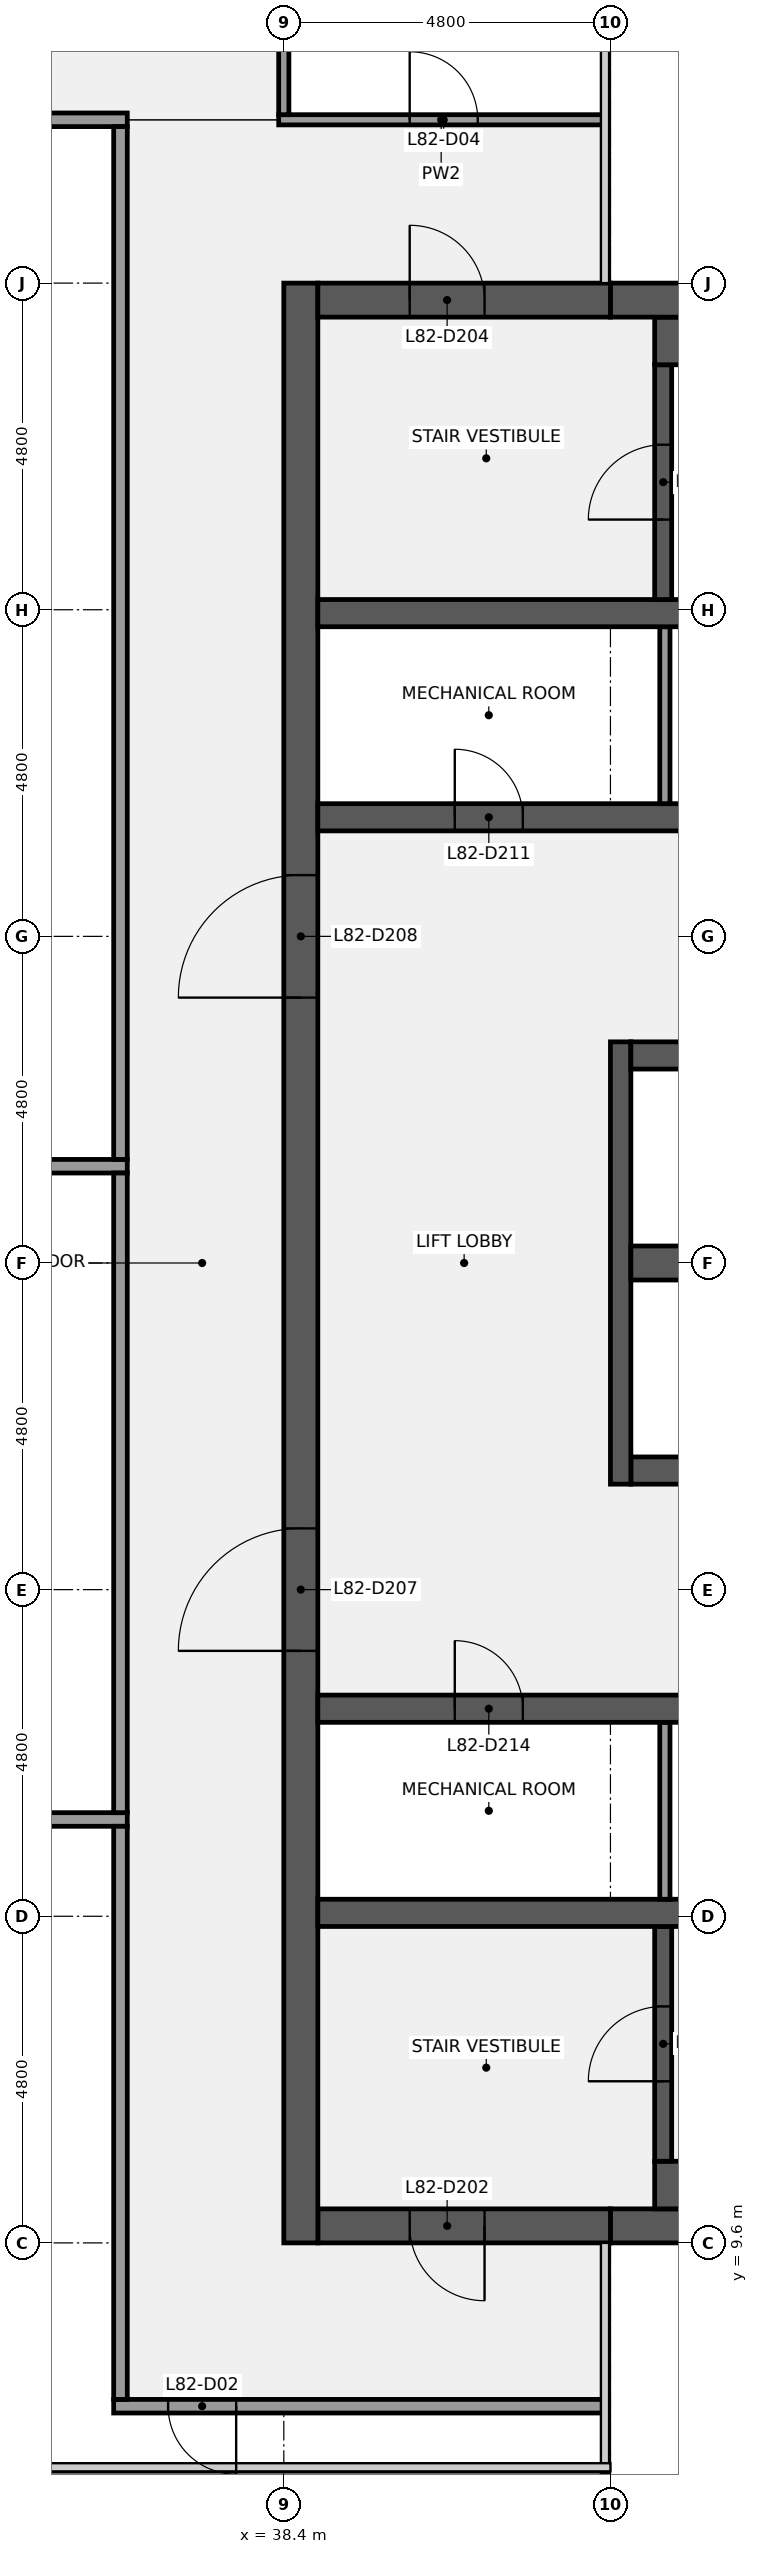
"""IFC4 building model, lengths in metres.
Left out: names, types, materials, properties, quantities, classifications, styles, units other than length and angle.
Written with IfcOpenShell. Run it as: python <this file> out.ifc"""

import sys

from ifc_helpers import new_model, si_unit, direction, frame, frame_2d, origin, place, context, subcontext, project, spatial, rectangle, extrude, element, fill, save


model = new_model("IFC4")
c1 = context("Model", 3, precision=1e-05, world=origin(), true_north=direction((0.0, 1.0)))
c2 = subcontext(c1, "Body", "Model", "MODEL_VIEW")
j1 = project(units=[si_unit("LENGTHUNIT", "METRE"), si_unit("PLANEANGLEUNIT", "RADIAN")], contexts=[c1])
p1 = place(None, origin())
s1 = spatial("IfcSite", under=j1, at=p1, CompositionType="ELEMENT")
p2 = place(p1, origin())
s2 = spatial("IfcBuilding", under=s1, at=p2, CompositionType="ELEMENT")
p3 = place(p2, frame((0.0, 0.0, 366.3)))
s3 = spatial("IfcBuildingStorey", under=s2, at=p3, CompositionType="ELEMENT", Elevation=366.3)
p4 = place(p3, frame((57.1, 9.85, 0.0), z_axis=(0.0, 0.0, 1.0), x_axis=(-1.0, 0.0, 0.0)))
e1 = element("IfcWall", 1, at=p4, inside=s3, PredefinedType="SHEAR", context=c2, shape_type="SweptSolid", body=[
    extrude(rectangle(XDim=13.9, YDim=0.5, at=frame_2d((6.95, 0.0))), origin(), (0.0, 0.0, 1.0), 3.75),
])
p5 = place(p3, frame((43.2, 9.85, 0.0), z_axis=(0.0, 0.0, 1.0), x_axis=(-1.0, 0.0, 0.0)))
e2 = element("IfcWall", 2, at=p5, inside=s3, PredefinedType="SHEAR", context=c2, shape_type="SweptSolid", body=[
    extrude(rectangle(XDim=4.3, YDim=0.5, at=frame_2d((2.15, 0.0))), origin(), (0.0, 0.0, 1.0), 3.75),
])
p6 = place(p5, frame((1.85, 0.0, 0.0)))
e3 = element("IfcOpeningElement", 3, at=p6, cuts=e2, PredefinedType="OPENING", context=c2, shape_type="SweptSolid", body=[
    extrude(rectangle(XDim=1.1, YDim=2.1, at=frame_2d((0.55, 1.05))), frame((0.0, 0.26, 0.0), z_axis=(0.0, -1.0, 0.0), x_axis=(1.0, 0.0, 0.0)), (0.0, 0.0, 1.0), 0.52),
])
p7 = place(p3, frame((38.65, 9.6, 0.0), z_axis=(0.0, 0.0, 1.0), x_axis=(0.0, 1.0, 0.0)))
e4 = element("IfcWall", 4, at=p7, inside=s3, PredefinedType="SHEAR", context=c2, shape_type="SweptSolid", body=[
    extrude(rectangle(XDim=28.8, YDim=0.5, at=frame_2d((14.4, 0.0))), origin(), (0.0, 0.0, 1.0), 3.75),
])
p8 = place(p7, frame((8.7, 0.0, 0.0)))
e5 = element("IfcOpeningElement", 5, at=p8, cuts=e4, PredefinedType="OPENING", context=c2, shape_type="SweptSolid", body=[
    extrude(rectangle(XDim=1.8, YDim=2.1, at=frame_2d((0.9, 1.05))), frame((0.0, 0.26, 0.0), z_axis=(0.0, -1.0, 0.0), x_axis=(1.0, 0.0, 0.0)), (0.0, 0.0, 1.0), 0.52),
])
p9 = place(p7, frame((18.3, 0.0, 0.0)))
e6 = element("IfcOpeningElement", 6, at=p9, cuts=e4, PredefinedType="OPENING", context=c2, shape_type="SweptSolid", body=[
    extrude(rectangle(XDim=1.8, YDim=2.1, at=frame_2d((0.9, 1.05))), frame((0.0, 0.26, 0.0), z_axis=(0.0, -1.0, 0.0), x_axis=(1.0, 0.0, 0.0)), (0.0, 0.0, 1.0), 0.52),
])
p10 = place(p3, frame((43.85, 10.45, 0.0), z_axis=(0.0, 0.0, 1.0), x_axis=(1.0, 0.0, 0.0)))
e7 = element("IfcWall", 7, at=p10, inside=s3, PredefinedType="SHEAR", context=c2, shape_type="SweptSolid", body=[
    extrude(rectangle(XDim=7.5, YDim=0.7, at=frame_2d((3.75, 0.0))), origin(), (0.0, 0.0, 1.0), 3.75),
])
p11 = place(p3, frame((43.975, 10.8, 0.0), z_axis=(0.0, 0.0, 1.0), x_axis=(0.0, 1.0, 0.0)))
e8 = element("IfcWall", 8, at=p11, inside=s3, PredefinedType="SHEAR", context=c2, shape_type="SweptSolid", body=[
    extrude(rectangle(XDim=3.45, YDim=0.25, at=frame_2d((1.725, 0.0))), origin(), (0.0, 0.0, 1.0), 3.75),
])
p12 = place(p11, frame((1.175, 0.0, 0.0)))
e9 = element("IfcOpeningElement", 9, at=p12, cuts=e8, PredefinedType="OPENING", context=c2, shape_type="SweptSolid", body=[
    extrude(rectangle(XDim=1.1, YDim=2.1, at=frame_2d((0.55, 1.05))), frame((0.0, 0.135, 0.0), z_axis=(0.0, -1.0, 0.0), x_axis=(1.0, 0.0, 0.0)), (0.0, 0.0, 1.0), 0.27),
])
p13 = place(p3, frame((38.9, 14.45, 0.0), z_axis=(0.0, 0.0, 1.0), x_axis=(1.0, 0.0, 0.0)))
e10 = element("IfcWall", 10, at=p13, inside=s3, PredefinedType="SHEAR", context=c2, shape_type="SweptSolid", body=[
    extrude(rectangle(XDim=18.2, YDim=0.4, at=frame_2d((9.1, 0.0))), origin(), (0.0, 0.0, 1.0), 3.75),
])
p14 = place(p3, frame((44.0, 14.65, 0.0), z_axis=(0.0, 0.0, 1.0), x_axis=(0.0, 1.0, 0.0)))
e11 = element("IfcWall", 11, at=p14, inside=s3, PredefinedType="PARTITIONING", context=c2, shape_type="SweptSolid", body=[
    extrude(rectangle(XDim=2.6, YDim=0.15, at=frame_2d((1.3, 0.0))), origin(), (0.0, 0.0, 1.0), 3.75),
])
p15 = place(p3, frame((38.9, 17.45, 0.0), z_axis=(0.0, 0.0, 1.0), x_axis=(1.0, 0.0, 0.0)))
e12 = element("IfcWall", 12, at=p15, inside=s3, PredefinedType="SHEAR", context=c2, shape_type="SweptSolid", body=[
    extrude(rectangle(XDim=18.2, YDim=0.4, at=frame_2d((9.1, 0.0))), origin(), (0.0, 0.0, 1.0), 3.75),
])
p16 = place(p15, frame((13.587, 0.0, 0.0)))
e13 = element("IfcOpeningElement", 13, at=p16, cuts=e12, PredefinedType="OPENING", context=c2, shape_type="SweptSolid", body=[
    extrude(rectangle(XDim=1.0, YDim=2.1, at=frame_2d((0.5, 1.05))), frame((0.0, 0.21, 0.0), z_axis=(0.0, -1.0, 0.0), x_axis=(1.0, 0.0, 0.0)), (0.0, 0.0, 1.0), 0.42),
])
p17 = place(p15, frame((7.0, 0.0, 0.0)))
e14 = element("IfcOpeningElement", 14, at=p17, cuts=e12, PredefinedType="OPENING", context=c2, shape_type="SweptSolid", body=[
    extrude(rectangle(XDim=1.0, YDim=2.1, at=frame_2d((0.5, 1.05))), frame((0.0, 0.21, 0.0), z_axis=(0.0, -1.0, 0.0), x_axis=(1.0, 0.0, 0.0)), (0.0, 0.0, 1.0), 0.42),
])
p18 = place(p15, frame((2.012, 0.0, 0.0)))
e15 = element("IfcOpeningElement", 15, at=p18, cuts=e12, PredefinedType="OPENING", context=c2, shape_type="SweptSolid", body=[
    extrude(rectangle(XDim=1.0, YDim=2.1, at=frame_2d((0.5, 1.05))), frame((0.0, 0.21, 0.0), z_axis=(0.0, -1.0, 0.0), x_axis=(1.0, 0.0, 0.0)), (0.0, 0.0, 1.0), 0.42),
])
p19 = place(p3, frame((43.5, 20.95, 0.0), z_axis=(0.0, 0.0, 1.0), x_axis=(1.0, 0.0, 0.0)))
e16 = element("IfcWall", 16, at=p19, inside=s3, PredefinedType="SHEAR", context=c2, shape_type="SweptSolid", body=[
    extrude(rectangle(XDim=13.6, YDim=0.4, at=frame_2d((6.8, 0.0))), origin(), (0.0, 0.0, 1.0), 3.75),
])
p20 = place(p19, frame((6.15, 0.0, 0.0)))
e17 = element("IfcOpeningElement", 17, at=p20, cuts=e16, PredefinedType="OPENING", context=c2, shape_type="SweptSolid", body=[
    extrude(rectangle(XDim=1.1, YDim=2.1, at=frame_2d((0.55, 1.05))), frame((0.0, 0.21, 0.0), z_axis=(0.0, -1.0, 0.0), x_axis=(1.0, 0.0, 0.0)), (0.0, 0.0, 1.0), 0.42),
])
p21 = place(p19, frame((1.3, 0.0, 0.0)))
e18 = element("IfcOpeningElement", 18, at=p21, cuts=e16, PredefinedType="OPENING", context=c2, shape_type="SweptSolid", body=[
    extrude(rectangle(XDim=1.0, YDim=2.1, at=frame_2d((0.5, 1.05))), frame((0.0, 0.21, 0.0), z_axis=(0.0, -1.0, 0.0), x_axis=(1.0, 0.0, 0.0)), (0.0, 0.0, 1.0), 0.42),
])
p22 = place(p3, frame((43.35, 20.75, 0.0), z_axis=(0.0, 0.0, 1.0), x_axis=(0.0, 1.0, 0.0)))
e19 = element("IfcWall", 19, at=p22, inside=s3, PredefinedType="SHEAR", context=c2, shape_type="SweptSolid", body=[
    extrude(rectangle(XDim=6.5, YDim=0.3, at=frame_2d((3.25, 0.0))), origin(), (0.0, 0.0, 1.0), 3.75),
])
p23 = place(p3, frame((43.5, 24.0, 0.0), z_axis=(0.0, 0.0, 1.0), x_axis=(1.0, 0.0, 0.0)))
e20 = element("IfcWall", 20, at=p23, inside=s3, PredefinedType="SHEAR", context=c2, shape_type="SweptSolid", body=[
    extrude(rectangle(XDim=13.6, YDim=0.5, at=frame_2d((6.8, 0.0))), origin(), (0.0, 0.0, 1.0), 3.75),
])
p24 = place(p3, frame((43.5, 27.05, 0.0), z_axis=(0.0, 0.0, 1.0), x_axis=(1.0, 0.0, 0.0)))
e21 = element("IfcWall", 21, at=p24, inside=s3, PredefinedType="SHEAR", context=c2, shape_type="SweptSolid", body=[
    extrude(rectangle(XDim=13.6, YDim=0.4, at=frame_2d((6.8, 0.0))), origin(), (0.0, 0.0, 1.0), 3.75),
])
p25 = place(p24, frame((8.7, 0.0, 0.0)))
e22 = element("IfcOpeningElement", 22, at=p25, cuts=e21, PredefinedType="OPENING", context=c2, shape_type="SweptSolid", body=[
    extrude(rectangle(XDim=1.0, YDim=2.1, at=frame_2d((0.5, 1.05))), frame((0.0, 0.21, 0.0), z_axis=(0.0, -1.0, 0.0), x_axis=(1.0, 0.0, 0.0)), (0.0, 0.0, 1.0), 0.42),
])
p26 = place(p24, frame((1.5, 0.0, 0.0)))
e23 = element("IfcOpeningElement", 23, at=p26, cuts=e21, PredefinedType="OPENING", context=c2, shape_type="SweptSolid", body=[
    extrude(rectangle(XDim=1.2, YDim=2.1, at=frame_2d((0.6, 1.05))), frame((0.0, 0.21, 0.0), z_axis=(0.0, -1.0, 0.0), x_axis=(1.0, 0.0, 0.0)), (0.0, 0.0, 1.0), 0.42),
])
p27 = place(p3, frame((38.9, 30.55, 0.0), z_axis=(0.0, 0.0, 1.0), x_axis=(1.0, 0.0, 0.0)))
e24 = element("IfcWall", 24, at=p27, inside=s3, PredefinedType="SHEAR", context=c2, shape_type="SweptSolid", body=[
    extrude(rectangle(XDim=18.2, YDim=0.4, at=frame_2d((9.1, 0.0))), origin(), (0.0, 0.0, 1.0), 3.75),
])
p28 = place(p27, frame((13.587, 0.0, 0.0)))
e25 = element("IfcOpeningElement", 25, at=p28, cuts=e24, PredefinedType="OPENING", context=c2, shape_type="SweptSolid", body=[
    extrude(rectangle(XDim=1.0, YDim=2.1, at=frame_2d((0.5, 1.05))), frame((0.0, 0.21, 0.0), z_axis=(0.0, -1.0, 0.0), x_axis=(1.0, 0.0, 0.0)), (0.0, 0.0, 1.0), 0.42),
])
p29 = place(p27, frame((7.0, 0.0, 0.0)))
e26 = element("IfcOpeningElement", 26, at=p29, cuts=e24, PredefinedType="OPENING", context=c2, shape_type="SweptSolid", body=[
    extrude(rectangle(XDim=1.0, YDim=2.1, at=frame_2d((0.5, 1.05))), frame((0.0, 0.21, 0.0), z_axis=(0.0, -1.0, 0.0), x_axis=(1.0, 0.0, 0.0)), (0.0, 0.0, 1.0), 0.42),
])
p30 = place(p27, frame((2.012, 0.0, 0.0)))
e27 = element("IfcOpeningElement", 27, at=p30, cuts=e24, PredefinedType="OPENING", context=c2, shape_type="SweptSolid", body=[
    extrude(rectangle(XDim=1.0, YDim=2.1, at=frame_2d((0.5, 1.05))), frame((0.0, 0.21, 0.0), z_axis=(0.0, -1.0, 0.0), x_axis=(1.0, 0.0, 0.0)), (0.0, 0.0, 1.0), 0.42),
])
p31 = place(p3, frame((44.0, 30.75, 0.0), z_axis=(0.0, 0.0, 1.0), x_axis=(0.0, 1.0, 0.0)))
e28 = element("IfcWall", 28, at=p31, inside=s3, PredefinedType="PARTITIONING", context=c2, shape_type="SweptSolid", body=[
    extrude(rectangle(XDim=2.6, YDim=0.15, at=frame_2d((1.3, 0.0))), origin(), (0.0, 0.0, 1.0), 3.75),
])
p32 = place(p3, frame((38.9, 33.55, 0.0), z_axis=(0.0, 0.0, 1.0), x_axis=(1.0, 0.0, 0.0)))
e29 = element("IfcWall", 29, at=p32, inside=s3, PredefinedType="SHEAR", context=c2, shape_type="SweptSolid", body=[
    extrude(rectangle(XDim=18.2, YDim=0.4, at=frame_2d((9.1, 0.0))), origin(), (0.0, 0.0, 1.0), 3.75),
])
p33 = place(p3, frame((43.975, 33.75, 0.0), z_axis=(0.0, 0.0, 1.0), x_axis=(0.0, 1.0, 0.0)))
e30 = element("IfcWall", 30, at=p33, inside=s3, PredefinedType="SHEAR", context=c2, shape_type="SweptSolid", body=[
    extrude(rectangle(XDim=3.45, YDim=0.25, at=frame_2d((1.725, 0.0))), origin(), (0.0, 0.0, 1.0), 3.75),
])
p34 = place(p33, frame((1.175, 0.0, 0.0)))
e31 = element("IfcOpeningElement", 31, at=p34, cuts=e30, PredefinedType="OPENING", context=c2, shape_type="SweptSolid", body=[
    extrude(rectangle(XDim=1.1, YDim=2.1, at=frame_2d((0.55, 1.05))), frame((0.0, 0.135, 0.0), z_axis=(0.0, -1.0, 0.0), x_axis=(1.0, 0.0, 0.0)), (0.0, 0.0, 1.0), 0.27),
])
p35 = place(p3, frame((43.85, 37.55, 0.0), z_axis=(0.0, 0.0, 1.0), x_axis=(1.0, 0.0, 0.0)))
e32 = element("IfcWall", 32, at=p35, inside=s3, PredefinedType="SHEAR", context=c2, shape_type="SweptSolid", body=[
    extrude(rectangle(XDim=7.5, YDim=0.7, at=frame_2d((3.75, 0.0))), origin(), (0.0, 0.0, 1.0), 3.75),
])
p36 = place(p3, frame((43.2, 38.15, 0.0), z_axis=(0.0, 0.0, 1.0), x_axis=(1.0, 0.0, 0.0)))
e33 = element("IfcWall", 33, at=p36, inside=s3, PredefinedType="SHEAR", context=c2, shape_type="SweptSolid", body=[
    extrude(rectangle(XDim=13.9, YDim=0.5, at=frame_2d((6.95, 0.0))), origin(), (0.0, 0.0, 1.0), 3.75),
])
p37 = place(p3, frame((38.9, 38.15, 0.0), z_axis=(0.0, 0.0, 1.0), x_axis=(1.0, 0.0, 0.0)))
e34 = element("IfcWall", 34, at=p37, inside=s3, PredefinedType="SHEAR", context=c2, shape_type="SweptSolid", body=[
    extrude(rectangle(XDim=4.3, YDim=0.5, at=frame_2d((2.15, 0.0))), origin(), (0.0, 0.0, 1.0), 3.75),
])
p38 = place(p37, frame((1.35, 0.0, 0.0)))
e35 = element("IfcOpeningElement", 35, at=p38, cuts=e34, PredefinedType="OPENING", context=c2, shape_type="SweptSolid", body=[
    extrude(rectangle(XDim=1.1, YDim=2.1, at=frame_2d((0.55, 1.05))), frame((0.0, 0.26, 0.0), z_axis=(0.0, -1.0, 0.0), x_axis=(1.0, 0.0, 0.0)), (0.0, 0.0, 1.0), 0.52),
])
p39 = place(p3, frame((35.9, 7.2, 0.0), z_axis=(0.0, 0.0, 1.0), x_axis=(1.0, 0.0, 0.0)))
e36 = element("IfcWall", 36, at=p39, inside=s3, PredefinedType="PARTITIONING", context=c2, shape_type="SweptSolid", body=[
    extrude(rectangle(XDim=7.2, YDim=0.2, at=frame_2d((3.6, 0.0))), origin(), (0.0, 0.0, 1.0), 2.759),
])
p40 = place(p39, frame((0.8, 0.0, 0.0)))
e37 = element("IfcOpeningElement", 37, at=p40, cuts=e36, PredefinedType="OPENING", context=c2, shape_type="SweptSolid", body=[
    extrude(rectangle(XDim=1.0, YDim=2.1, at=frame_2d((0.5, 1.05))), frame((0.0, 0.11, 0.0), z_axis=(0.0, -1.0, 0.0), x_axis=(1.0, 0.0, 0.0)), (0.0, 0.0, 1.0), 0.22),
])
for number, where, z_axis, x_axis in (
    (38, (21.5, 15.822, 0.0), (0.0, 0.0, 1.0), (1.0, 0.0, 0.0)),
    (39, (21.5, 25.422, 0.0), (0.0, 0.0, 1.0), (1.0, 0.0, 0.0)),
):
    element("IfcWall", number, at=place(p3, frame(where, z_axis=z_axis, x_axis=x_axis)), inside=s3, PredefinedType="PARTITIONING", context=c2, shape_type="SweptSolid", body=[
        extrude(rectangle(XDim=14.6, YDim=0.2, at=frame_2d((7.3, 0.0))), origin(), (0.0, 0.0, 1.0), 2.759),
    ])
p41 = place(p3, frame((38.325, 40.8, 0.0), z_axis=(0.0, 0.0, 1.0), x_axis=(1.0, 0.0, 0.0)))
e40 = element("IfcWall", 40, at=p41, inside=s3, PredefinedType="PARTITIONING", context=c2, shape_type="SweptSolid", body=[
    extrude(rectangle(XDim=4.775, YDim=0.15, at=frame_2d((2.388, 0.0))), origin(), (0.0, 0.0, 1.0), 2.759),
])
p42 = place(p41, frame((1.925, 0.0, 0.0)))
e41 = element("IfcOpeningElement", 41, at=p42, cuts=e40, PredefinedType="OPENING", context=c2, shape_type="SweptSolid", body=[
    extrude(rectangle(XDim=1.0, YDim=2.1, at=frame_2d((0.5, 1.05))), frame((0.0, 0.085, 0.0), z_axis=(0.0, -1.0, 0.0), x_axis=(1.0, 0.0, 0.0)), (0.0, 0.0, 1.0), 0.17),
])
p43 = place(p3, frame((21.5, 40.8, 0.0), z_axis=(0.0, 0.0, 1.0), x_axis=(1.0, 0.0, 0.0)))
e42 = element("IfcWall", 42, at=p43, inside=s3, PredefinedType="PARTITIONING", context=c2, shape_type="SweptSolid", body=[
    extrude(rectangle(XDim=14.6, YDim=0.2, at=frame_2d((7.3, 0.0))), origin(), (0.0, 0.0, 1.0), 2.759),
])
p44 = place(p3, frame((36.0, 7.3, 0.0), z_axis=(0.0, 0.0, 1.0), x_axis=(0.0, 1.0, 0.0)))
e43 = element("IfcWall", 43, at=p44, inside=s3, PredefinedType="PARTITIONING", context=c2, shape_type="SweptSolid", body=[
    extrude(rectangle(XDim=8.422, YDim=0.2, at=frame_2d((4.211, 0.0))), origin(), (0.0, 0.0, 1.0), 2.759),
])
p45 = place(p3, frame((36.0, 15.922, 0.0), z_axis=(0.0, 0.0, 1.0), x_axis=(0.0, 1.0, 0.0)))
e44 = element("IfcWall", 44, at=p45, inside=s3, PredefinedType="PARTITIONING", context=c2, shape_type="SweptSolid", body=[
    extrude(rectangle(XDim=9.4, YDim=0.2, at=frame_2d((4.7, 0.0))), origin(), (0.0, 0.0, 1.0), 2.759),
])
p46 = place(p3, frame((36.0, 25.522, 0.0), z_axis=(0.0, 0.0, 1.0), x_axis=(0.0, 1.0, 0.0)))
e45 = element("IfcWall", 45, at=p46, inside=s3, PredefinedType="PARTITIONING", context=c2, shape_type="SweptSolid", body=[
    extrude(rectangle(XDim=15.178, YDim=0.2, at=frame_2d((7.589, 0.0))), origin(), (0.0, 0.0, 1.0), 2.759),
])
p47 = place(p3, frame((38.4, 40.875, 0.0), z_axis=(0.0, 0.0, 1.0), x_axis=(0.0, 1.0, 0.0)))
e46 = element("IfcWall", 46, at=p47, inside=s3, PredefinedType="PARTITIONING", context=c2, shape_type="SweptSolid", body=[
    extrude(rectangle(XDim=2.225, YDim=0.15, at=frame_2d((1.113, 0.0))), origin(), (0.0, 0.0, 1.0), 2.759),
])
p48 = place(p12, origin())
e47 = element("IfcDoor", 47, at=p48, inside=s3, OperationType="SINGLE_SWING_LEFT", PredefinedType="DOOR", context=c2, shape_type="SweptSolid", body=[
    extrude(rectangle(XDim=1.1, YDim=2.1, at=frame_2d((0.55, 1.05))), frame((0.0, 0.025, 0.0), z_axis=(0.0, -1.0, 0.0), x_axis=(1.0, 0.0, 0.0)), (0.0, 0.0, 1.0), 0.05),
])
fill(e9, e47)
p49 = place(p6, origin())
e48 = element("IfcDoor", 48, at=p49, inside=s3, OperationType="SINGLE_SWING_LEFT", PredefinedType="DOOR", context=c2, shape_type="SweptSolid", body=[
    extrude(rectangle(XDim=1.1, YDim=2.1, at=frame_2d((0.55, 1.05))), frame((0.0, 0.025, 0.0), z_axis=(0.0, -1.0, 0.0), x_axis=(1.0, 0.0, 0.0)), (0.0, 0.0, 1.0), 0.05),
])
fill(e3, e48)
p50 = place(p34, origin())
e49 = element("IfcDoor", 49, at=p50, inside=s3, OperationType="SINGLE_SWING_LEFT", PredefinedType="DOOR", context=c2, shape_type="SweptSolid", body=[
    extrude(rectangle(XDim=1.1, YDim=2.1, at=frame_2d((0.55, 1.05))), frame((0.0, 0.025, 0.0), z_axis=(0.0, -1.0, 0.0), x_axis=(1.0, 0.0, 0.0)), (0.0, 0.0, 1.0), 0.05),
])
fill(e31, e49)
p51 = place(p38, origin())
e50 = element("IfcDoor", 50, at=p51, inside=s3, OperationType="SINGLE_SWING_LEFT", PredefinedType="DOOR", context=c2, shape_type="SweptSolid", body=[
    extrude(rectangle(XDim=1.1, YDim=2.1, at=frame_2d((0.55, 1.05))), frame((0.0, 0.025, 0.0), z_axis=(0.0, -1.0, 0.0), x_axis=(1.0, 0.0, 0.0)), (0.0, 0.0, 1.0), 0.05),
])
fill(e35, e50)
p52 = place(p8, origin())
e51 = element("IfcDoor", 51, at=p52, inside=s3, OperationType="DOUBLE_DOOR_SINGLE_SWING", PredefinedType="DOOR", context=c2, shape_type="SweptSolid", body=[
    extrude(rectangle(XDim=1.8, YDim=2.1, at=frame_2d((0.9, 1.05))), frame((0.0, 0.025, 0.0), z_axis=(0.0, -1.0, 0.0), x_axis=(1.0, 0.0, 0.0)), (0.0, 0.0, 1.0), 0.05),
])
fill(e5, e51)
p53 = place(p9, origin())
e52 = element("IfcDoor", 52, at=p53, inside=s3, OperationType="DOUBLE_DOOR_SINGLE_SWING", PredefinedType="DOOR", context=c2, shape_type="SweptSolid", body=[
    extrude(rectangle(XDim=1.8, YDim=2.1, at=frame_2d((0.9, 1.05))), frame((0.0, 0.025, 0.0), z_axis=(0.0, -1.0, 0.0), x_axis=(1.0, 0.0, 0.0)), (0.0, 0.0, 1.0), 0.05),
])
fill(e6, e52)
p54 = place(p30, origin())
e53 = element("IfcDoor", 53, at=p54, inside=s3, OperationType="SINGLE_SWING_LEFT", PredefinedType="DOOR", context=c2, shape_type="SweptSolid", body=[
    extrude(rectangle(XDim=1.0, YDim=2.1, at=frame_2d((0.5, 1.05))), frame((0.0, 0.025, 0.0), z_axis=(0.0, -1.0, 0.0), x_axis=(1.0, 0.0, 0.0)), (0.0, 0.0, 1.0), 0.05),
])
fill(e27, e53)
p55 = place(p18, origin())
e54 = element("IfcDoor", 54, at=p55, inside=s3, OperationType="SINGLE_SWING_LEFT", PredefinedType="DOOR", context=c2, shape_type="SweptSolid", body=[
    extrude(rectangle(XDim=1.0, YDim=2.1, at=frame_2d((0.5, 1.05))), frame((0.0, 0.025, 0.0), z_axis=(0.0, -1.0, 0.0), x_axis=(1.0, 0.0, 0.0)), (0.0, 0.0, 1.0), 0.05),
])
fill(e15, e54)
p56 = place(p40, origin())
e55 = element("IfcDoor", 55, at=p56, inside=s3, OperationType="SINGLE_SWING_RIGHT", PredefinedType="DOOR", context=c2, shape_type="SweptSolid", body=[
    extrude(rectangle(XDim=1.0, YDim=2.1, at=frame_2d((0.5, 1.05))), frame((0.0, 0.025, 0.0), z_axis=(0.0, -1.0, 0.0), x_axis=(1.0, 0.0, 0.0)), (0.0, 0.0, 1.0), 0.05),
])
fill(e37, e55)
p57 = place(p42, origin())
e56 = element("IfcDoor", 56, at=p57, inside=s3, OperationType="SINGLE_SWING_LEFT", PredefinedType="DOOR", context=c2, shape_type="SweptSolid", body=[
    extrude(rectangle(XDim=1.0, YDim=2.1, at=frame_2d((0.5, 1.05))), frame((0.0, 0.025, 0.0), z_axis=(0.0, -1.0, 0.0), x_axis=(1.0, 0.0, 0.0)), (0.0, 0.0, 1.0), 0.05),
])
fill(e41, e56)
save(model, sys.argv[1])
